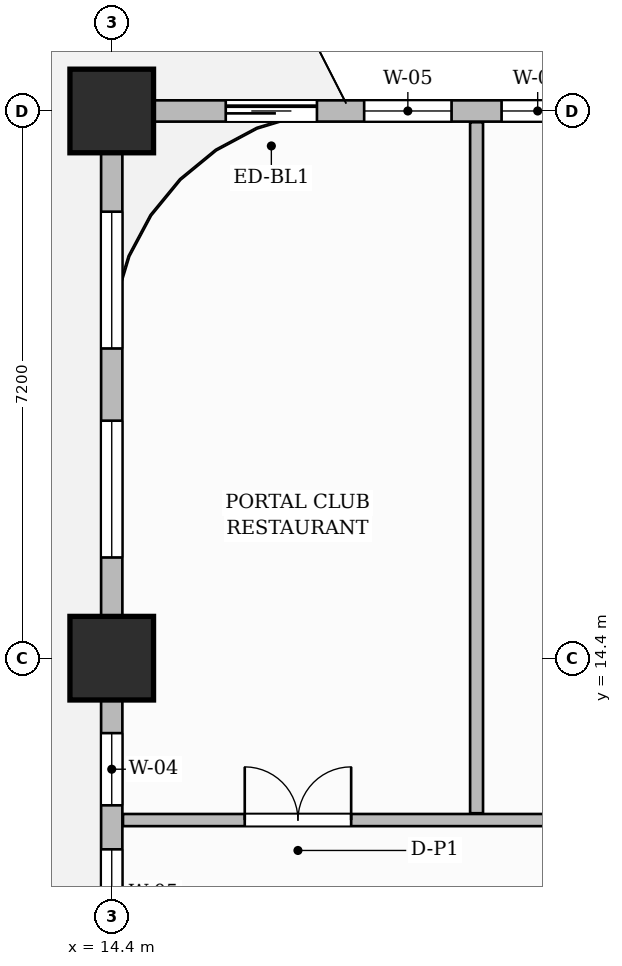
"""IFC4 building model, lengths in metres.
Left out: names, types, materials, properties, quantities, classifications, styles, units other than length and angle.
Written with IfcOpenShell. Run it as: python <this file> out.ifc"""

import sys

from ifc_helpers import new_model, si_unit, direction, frame, frame_2d, origin, origin_2d, place, context, subcontext, project, spatial, rectangle, extrude, source, transform, mapped, element, fill, save


model = new_model("IFC4")
c1 = context("Model", 3, precision=1e-05, world=origin(), true_north=direction((0.0, 1.0)))
c2 = subcontext(c1, "Body", "Model", "MODEL_VIEW")
j1 = project(units=[si_unit("LENGTHUNIT", "METRE"), si_unit("PLANEANGLEUNIT", "RADIAN")], contexts=[c1])
p1 = place(None, origin())
s1 = spatial("IfcSite", under=j1, at=p1, CompositionType="ELEMENT")
p2 = place(p1, origin())
s2 = spatial("IfcBuilding", under=s1, at=p2, CompositionType="ELEMENT")
p3 = place(p2, frame((0.0, 0.0, 50.9)))
s3 = spatial("IfcBuildingStorey", under=s2, at=p3, CompositionType="ELEMENT", Elevation=50.9)
m1 = source(origin(), c2, "Body", "SweptSolid", [
    extrude(rectangle(XDim=1.1, YDim=1.1, at=origin_2d()), origin(), (0.0, 0.0, 1.0), 3.7),
])
for number, where, z_axis, x_axis in (
    (1, (14.4, 14.4, 0.0), (0.0, 0.0, 1.0), (1.0, 0.0, 0.0)),
    (2, (14.4, 21.6, 0.0), (0.0, 0.0, 1.0), (1.0, 0.0, 0.0)),
):
    element("IfcColumn", number, at=place(p3, frame(where, z_axis=z_axis, x_axis=x_axis)), inside=s3, PredefinedType="COLUMN", context=c2, shape_type="MappedRepresentation", body=[
        mapped(m1, transform((0.0, 0.0, 0.0), scale=1.0)),
    ])
p4 = place(p3, frame((14.548, 12.27, 0.0), z_axis=(0.0, 0.0, 1.0), x_axis=(1.0, 0.0, 0.0)))
e3 = element("IfcWall", 3, at=p4, inside=s3, PredefinedType="PARTITIONING", context=c2, shape_type="SweptSolid", body=[
    extrude(rectangle(XDim=15.562, YDim=0.16, at=frame_2d((7.781, 0.0))), origin(), (0.0, 0.0, 1.0), 3.45),
])
p5 = place(p4, frame((1.602, 0.0, 0.0)))
e4 = element("IfcOpeningElement", 4, at=p5, cuts=e3, PredefinedType="OPENING", context=c2, shape_type="SweptSolid", body=[
    extrude(rectangle(XDim=1.4, YDim=2.35, at=frame_2d((0.7, 1.175))), frame((0.0, 0.09, 0.0), z_axis=(0.0, -1.0, 0.0), x_axis=(1.0, 0.0, 0.0)), (0.0, 0.0, 1.0), 0.18),
])
p6 = place(p4, frame((5.777, 0.0, 0.0)))
e5 = element("IfcOpeningElement", 5, at=p6, cuts=e3, PredefinedType="OPENING", context=c2, shape_type="SweptSolid", body=[
    extrude(rectangle(XDim=1.0, YDim=2.2, at=frame_2d((0.5, 1.1))), frame((0.0, 0.09, 0.0), z_axis=(0.0, -1.0, 0.0), x_axis=(1.0, 0.0, 0.0)), (0.0, 0.0, 1.0), 0.18),
])
p7 = place(p4, frame((13.602, 0.0, 0.0)))
e6 = element("IfcOpeningElement", 6, at=p7, cuts=e3, PredefinedType="OPENING", context=c2, shape_type="SweptSolid", body=[
    extrude(rectangle(XDim=1.05, YDim=2.25, at=frame_2d((0.525, 1.125))), frame((0.0, 0.09, 0.0), z_axis=(0.0, -1.0, 0.0), x_axis=(1.0, 0.0, 0.0)), (0.0, 0.0, 1.0), 0.18),
])
p8 = place(p3, frame((19.2, 12.36, 0.0), z_axis=(0.0, 0.0, 1.0), x_axis=(0.0, 1.0, 0.0)))
e7 = element("IfcWall", 7, at=p8, inside=s3, PredefinedType="PARTITIONING", context=c2, shape_type="SweptSolid", body=[
    extrude(rectangle(XDim=9.092, YDim=0.17, at=frame_2d((4.546, 0.0))), origin(), (0.0, 0.0, 1.0), 3.45),
])
p9 = place(p3, frame((14.4, 21.6, 0.0), z_axis=(0.0, 0.0, 1.0), x_axis=(1.0, 0.0, 0.0)))
e8 = element("IfcWall", 8, at=p9, inside=s3, PredefinedType="SOLIDWALL", context=c2, shape_type="SweptSolid", body=[
    extrude(rectangle(XDim=43.2, YDim=0.28, at=frame_2d((21.6, 0.0))), origin(), (0.0, 0.0, 1.0), 2.885),
])
p10 = place(p9, frame((1.5, 0.0, 0.0)))
e9 = element("IfcOpeningElement", 9, at=p10, cuts=e8, PredefinedType="OPENING", context=c2, shape_type="SweptSolid", body=[
    extrude(rectangle(XDim=1.2, YDim=2.2, at=frame_2d((0.6, 1.1))), frame((0.0, 0.15, 0.0), z_axis=(0.0, -1.0, 0.0), x_axis=(1.0, 0.0, 0.0)), (0.0, 0.0, 1.0), 0.3),
])
p11 = place(p9, frame((3.321, 0.0, 0.8)))
e10 = element("IfcOpeningElement", 10, at=p11, cuts=e8, PredefinedType="OPENING", context=c2, shape_type="SweptSolid", body=[
    extrude(rectangle(XDim=1.15, YDim=1.8, at=frame_2d((0.575, 0.9))), frame((0.0, 0.15, 0.0), z_axis=(0.0, -1.0, 0.0), x_axis=(1.0, 0.0, 0.0)), (0.0, 0.0, 1.0), 0.3),
])
p12 = place(p9, frame((5.129, 0.0, 0.8)))
e11 = element("IfcOpeningElement", 11, at=p12, cuts=e8, PredefinedType="OPENING", context=c2, shape_type="SweptSolid", body=[
    extrude(rectangle(XDim=0.95, YDim=1.75, at=frame_2d((0.475, 0.875))), frame((0.0, 0.15, 0.0), z_axis=(0.0, -1.0, 0.0), x_axis=(1.0, 0.0, 0.0)), (0.0, 0.0, 1.0), 0.3),
])
p13 = place(p9, frame((8.496, 0.0, 0.8)))
e12 = element("IfcOpeningElement", 12, at=p13, cuts=e8, PredefinedType="OPENING", context=c2, shape_type="SweptSolid", body=[
    extrude(rectangle(XDim=1.4, YDim=1.85, at=frame_2d((0.7, 0.925))), frame((0.0, 0.15, 0.0), z_axis=(0.0, -1.0, 0.0), x_axis=(1.0, 0.0, 0.0)), (0.0, 0.0, 1.0), 0.3),
])
p14 = place(p9, frame((11.104, 0.0, 0.8)))
e13 = element("IfcOpeningElement", 13, at=p14, cuts=e8, PredefinedType="OPENING", context=c2, shape_type="SweptSolid", body=[
    extrude(rectangle(XDim=1.8, YDim=1.85, at=frame_2d((0.9, 0.925))), frame((0.0, 0.15, 0.0), z_axis=(0.0, -1.0, 0.0), x_axis=(1.0, 0.0, 0.0)), (0.0, 0.0, 1.0), 0.3),
])
p15 = place(p9, frame((16.701, 0.0, 0.8)))
e14 = element("IfcOpeningElement", 14, at=p15, cuts=e8, PredefinedType="OPENING", context=c2, shape_type="SweptSolid", body=[
    extrude(rectangle(XDim=1.8, YDim=1.85, at=frame_2d((0.9, 0.925))), frame((0.0, 0.15, 0.0), z_axis=(0.0, -1.0, 0.0), x_axis=(1.0, 0.0, 0.0)), (0.0, 0.0, 1.0), 0.3),
])
p16 = place(p9, frame((21.725, 0.0, 0.8)))
e15 = element("IfcOpeningElement", 15, at=p16, cuts=e8, PredefinedType="OPENING", context=c2, shape_type="SweptSolid", body=[
    extrude(rectangle(XDim=1.8, YDim=1.85, at=frame_2d((0.9, 0.925))), frame((0.0, 0.15, 0.0), z_axis=(0.0, -1.0, 0.0), x_axis=(1.0, 0.0, 0.0)), (0.0, 0.0, 1.0), 0.3),
])
p17 = place(p9, frame((24.475, 0.0, 0.8)))
e16 = element("IfcOpeningElement", 16, at=p17, cuts=e8, PredefinedType="OPENING", context=c2, shape_type="SweptSolid", body=[
    extrude(rectangle(XDim=1.8, YDim=1.85, at=frame_2d((0.9, 0.925))), frame((0.0, 0.15, 0.0), z_axis=(0.0, -1.0, 0.0), x_axis=(1.0, 0.0, 0.0)), (0.0, 0.0, 1.0), 0.3),
])
p18 = place(p9, frame((29.075, 0.0, 0.8)))
e17 = element("IfcOpeningElement", 17, at=p18, cuts=e8, PredefinedType="OPENING", context=c2, shape_type="SweptSolid", body=[
    extrude(rectangle(XDim=1.8, YDim=1.85, at=frame_2d((0.9, 0.925))), frame((0.0, 0.15, 0.0), z_axis=(0.0, -1.0, 0.0), x_axis=(1.0, 0.0, 0.0)), (0.0, 0.0, 1.0), 0.3),
])
p19 = place(p9, frame((32.125, 0.0, 0.8)))
e18 = element("IfcOpeningElement", 18, at=p19, cuts=e8, PredefinedType="OPENING", context=c2, shape_type="SweptSolid", body=[
    extrude(rectangle(XDim=1.8, YDim=1.85, at=frame_2d((0.9, 0.925))), frame((0.0, 0.15, 0.0), z_axis=(0.0, -1.0, 0.0), x_axis=(1.0, 0.0, 0.0)), (0.0, 0.0, 1.0), 0.3),
])
p20 = place(p9, frame((36.875, 0.0, 0.8)))
e19 = element("IfcOpeningElement", 19, at=p20, cuts=e8, PredefinedType="OPENING", context=c2, shape_type="SweptSolid", body=[
    extrude(rectangle(XDim=1.8, YDim=1.85, at=frame_2d((0.9, 0.925))), frame((0.0, 0.15, 0.0), z_axis=(0.0, -1.0, 0.0), x_axis=(1.0, 0.0, 0.0)), (0.0, 0.0, 1.0), 0.3),
])
p21 = place(p9, frame((39.925, 0.0, 0.8)))
e20 = element("IfcOpeningElement", 20, at=p21, cuts=e8, PredefinedType="OPENING", context=c2, shape_type="SweptSolid", body=[
    extrude(rectangle(XDim=1.8, YDim=1.85, at=frame_2d((0.9, 0.925))), frame((0.0, 0.15, 0.0), z_axis=(0.0, -1.0, 0.0), x_axis=(1.0, 0.0, 0.0)), (0.0, 0.0, 1.0), 0.3),
])
p22 = place(p3, frame((14.4, 0.05, 0.0), z_axis=(0.0, 0.0, 1.0), x_axis=(0.0, 1.0, 0.0)))
e21 = element("IfcWall", 21, at=p22, inside=s3, PredefinedType="SOLIDWALL", context=c2, shape_type="SweptSolid", body=[
    extrude(rectangle(XDim=21.5, YDim=0.28, at=frame_2d((10.75, 0.0))), origin(), (0.0, 0.0, 1.0), 2.885),
])
p23 = place(p22, frame((1.275, 0.0, 0.8)))
e22 = element("IfcOpeningElement", 22, at=p23, cuts=e21, PredefinedType="OPENING", context=c2, shape_type="SweptSolid", body=[
    extrude(rectangle(XDim=1.8, YDim=1.85, at=frame_2d((0.9, 0.925))), frame((0.0, 0.15, 0.0), z_axis=(0.0, -1.0, 0.0), x_axis=(1.0, 0.0, 0.0)), (0.0, 0.0, 1.0), 0.3),
])
p24 = place(p22, frame((4.025, 0.0, 0.8)))
e23 = element("IfcOpeningElement", 23, at=p24, cuts=e21, PredefinedType="OPENING", context=c2, shape_type="SweptSolid", body=[
    extrude(rectangle(XDim=1.8, YDim=1.85, at=frame_2d((0.9, 0.925))), frame((0.0, 0.15, 0.0), z_axis=(0.0, -1.0, 0.0), x_axis=(1.0, 0.0, 0.0)), (0.0, 0.0, 1.0), 0.3),
])
p25 = place(p22, frame((8.421, 0.0, 0.8)))
e24 = element("IfcOpeningElement", 24, at=p25, cuts=e21, PredefinedType="OPENING", context=c2, shape_type="SweptSolid", body=[
    extrude(rectangle(XDim=1.4, YDim=1.85, at=frame_2d((0.7, 0.925))), frame((0.0, 0.15, 0.0), z_axis=(0.0, -1.0, 0.0), x_axis=(1.0, 0.0, 0.0)), (0.0, 0.0, 1.0), 0.3),
])
p26 = place(p22, frame((10.685, 0.0, 0.8)))
e25 = element("IfcOpeningElement", 25, at=p26, cuts=e21, PredefinedType="OPENING", context=c2, shape_type="SweptSolid", body=[
    extrude(rectangle(XDim=1.15, YDim=1.8, at=frame_2d((0.575, 0.9))), frame((0.0, 0.15, 0.0), z_axis=(0.0, -1.0, 0.0), x_axis=(1.0, 0.0, 0.0)), (0.0, 0.0, 1.0), 0.3),
])
p27 = place(p22, frame((12.414, 0.0, 0.8)))
e26 = element("IfcOpeningElement", 26, at=p27, cuts=e21, PredefinedType="OPENING", context=c2, shape_type="SweptSolid", body=[
    extrude(rectangle(XDim=0.95, YDim=1.75, at=frame_2d((0.475, 0.875))), frame((0.0, 0.15, 0.0), z_axis=(0.0, -1.0, 0.0), x_axis=(1.0, 0.0, 0.0)), (0.0, 0.0, 1.0), 0.3),
])
p28 = place(p22, frame((15.675, 0.0, 0.8)))
e27 = element("IfcOpeningElement", 27, at=p28, cuts=e21, PredefinedType="OPENING", context=c2, shape_type="SweptSolid", body=[
    extrude(rectangle(XDim=1.8, YDim=1.85, at=frame_2d((0.9, 0.925))), frame((0.0, 0.15, 0.0), z_axis=(0.0, -1.0, 0.0), x_axis=(1.0, 0.0, 0.0)), (0.0, 0.0, 1.0), 0.3),
])
p29 = place(p22, frame((18.425, 0.0, 0.8)))
e28 = element("IfcOpeningElement", 28, at=p29, cuts=e21, PredefinedType="OPENING", context=c2, shape_type="SweptSolid", body=[
    extrude(rectangle(XDim=1.8, YDim=1.85, at=frame_2d((0.9, 0.925))), frame((0.0, 0.15, 0.0), z_axis=(0.0, -1.0, 0.0), x_axis=(1.0, 0.0, 0.0)), (0.0, 0.0, 1.0), 0.3),
])
m2 = source(origin(), c2, "Body", "SweptSolid", [
    extrude(rectangle(XDim=1.4, YDim=2.35, at=frame_2d((0.7, 1.175))), frame((0.0, 0.025, 0.0), z_axis=(0.0, -1.0, 0.0), x_axis=(1.0, 0.0, 0.0)), (0.0, 0.0, 1.0), 0.05),
])
p30 = place(p5, origin())
e29 = element("IfcDoor", 29, at=p30, inside=s3, OperationType="DOUBLE_DOOR_SINGLE_SWING", PredefinedType="DOOR", context=c2, shape_type="MappedRepresentation", body=[
    mapped(m2, transform((0.0, 0.0, 0.0), scale=1.0)),
])
fill(e4, e29)
m3 = source(origin(), c2, "Body", "SweptSolid", [
    extrude(rectangle(XDim=1.2, YDim=2.2, at=frame_2d((0.6, 1.1))), frame((0.0, 0.025, 0.0), z_axis=(0.0, -1.0, 0.0), x_axis=(1.0, 0.0, 0.0)), (0.0, 0.0, 1.0), 0.05),
])
p31 = place(p10, origin())
e30 = element("IfcDoor", 30, at=p31, inside=s3, OperationType="SLIDING_TO_LEFT", PredefinedType="DOOR", context=c2, shape_type="MappedRepresentation", body=[
    mapped(m3, transform((0.0, 0.0, 0.0), scale=1.0)),
])
fill(e9, e30)
m4 = source(origin(), c2, "Body", "SweptSolid", [
    extrude(rectangle(XDim=1.15, YDim=1.8, at=frame_2d((0.575, 0.9))), frame((0.0, 0.03, 0.0), z_axis=(0.0, -1.0, 0.0), x_axis=(1.0, 0.0, 0.0)), (0.0, 0.0, 1.0), 0.06),
])
p32 = place(p11, origin())
e31 = element("IfcWindow", 31, at=p32, inside=s3, PartitioningType="SINGLE_PANEL", PredefinedType="WINDOW", context=c2, shape_type="MappedRepresentation", body=[
    mapped(m4, transform((0.0, 0.0, 0.0), scale=1.0)),
])
fill(e10, e31)
m5 = source(origin(), c2, "Body", "SweptSolid", [
    extrude(rectangle(XDim=0.95, YDim=1.75, at=frame_2d((0.475, 0.875))), frame((0.0, 0.03, 0.0), z_axis=(0.0, -1.0, 0.0), x_axis=(1.0, 0.0, 0.0)), (0.0, 0.0, 1.0), 0.06),
])
p33 = place(p12, origin())
e32 = element("IfcWindow", 32, at=p33, inside=s3, PartitioningType="SINGLE_PANEL", PredefinedType="WINDOW", context=c2, shape_type="MappedRepresentation", body=[
    mapped(m5, transform((0.0, 0.0, 0.0), scale=1.0)),
])
fill(e11, e32)
p34 = place(p26, origin())
e33 = element("IfcWindow", 33, at=p34, inside=s3, PartitioningType="SINGLE_PANEL", PredefinedType="WINDOW", context=c2, shape_type="MappedRepresentation", body=[
    mapped(m4, transform((0.0, 0.0, 0.0), scale=1.0)),
])
fill(e25, e33)
p35 = place(p27, origin())
e34 = element("IfcWindow", 34, at=p35, inside=s3, PartitioningType="SINGLE_PANEL", PredefinedType="WINDOW", context=c2, shape_type="MappedRepresentation", body=[
    mapped(m5, transform((0.0, 0.0, 0.0), scale=1.0)),
])
fill(e26, e34)
m6 = source(origin(), c2, "Body", "SweptSolid", [
    extrude(rectangle(XDim=1.8, YDim=1.85, at=frame_2d((0.9, 0.925))), frame((0.0, 0.03, 0.0), z_axis=(0.0, -1.0, 0.0), x_axis=(1.0, 0.0, 0.0)), (0.0, 0.0, 1.0), 0.06),
])
p36 = place(p28, origin())
e35 = element("IfcWindow", 35, at=p36, inside=s3, PartitioningType="DOUBLE_PANEL_VERTICAL", PredefinedType="WINDOW", context=c2, shape_type="MappedRepresentation", body=[
    mapped(m6, transform((0.0, 0.0, 0.0), scale=1.0)),
])
fill(e27, e35)
p37 = place(p29, origin())
e36 = element("IfcWindow", 36, at=p37, inside=s3, PartitioningType="DOUBLE_PANEL_VERTICAL", PredefinedType="WINDOW", context=c2, shape_type="MappedRepresentation", body=[
    mapped(m6, transform((0.0, 0.0, 0.0), scale=1.0)),
])
fill(e28, e36)
save(model, sys.argv[1])
